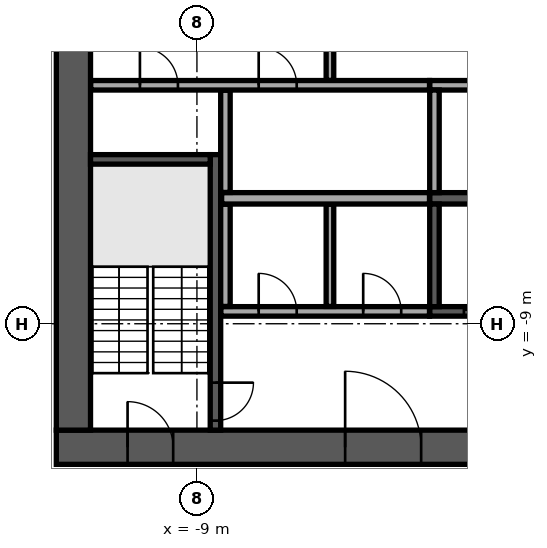
"""IFC4 building model, lengths in metres.
Left out: names, types, materials, properties, quantities, classifications, styles, units other than length and angle.
Written with IfcOpenShell. Run it as: python <this file> out.ifc"""

import sys

from ifc_helpers import new_model, si_unit, direction, frame, frame_2d, origin, place, context, subcontext, project, spatial, rectangle, extrude, element, fill, save


model = new_model("IFC4")
c1 = context("Model", 3, precision=1e-05, world=origin(), true_north=direction((0.0, 1.0)))
c2 = subcontext(c1, "Body", "Model", "MODEL_VIEW")
j1 = project(units=[si_unit("LENGTHUNIT", "METRE"), si_unit("PLANEANGLEUNIT", "RADIAN")], contexts=[c1])
p1 = place(None, origin())
s1 = spatial("IfcSite", under=j1, at=p1, CompositionType="ELEMENT")
p2 = place(p1, origin())
s2 = spatial("IfcBuilding", under=s1, at=p2, CompositionType="ELEMENT")
p3 = place(p2, frame((0.0, 0.0, 189.3)))
s3 = spatial("IfcBuildingStorey", under=s2, at=p3, CompositionType="ELEMENT", Elevation=189.3)
p4 = place(p3, frame((-12.7, -12.25, 0.0), z_axis=(0.0, 0.0, 1.0), x_axis=(1.0, 0.0, 0.0)))
e1 = element("IfcWall", 1, at=p4, inside=s3, PredefinedType="SHEAR", context=c2, shape_type="SweptSolid", body=[
    extrude(rectangle(XDim=25.4, YDim=0.9, at=frame_2d((12.7, 0.0))), origin(), (0.0, 0.0, 1.0), 3.62),
])
p5 = place(p4, frame((7.6, 0.0, 0.0)))
e2 = element("IfcOpeningElement", 2, at=p5, cuts=e1, PredefinedType="OPENING", context=c2, shape_type="SweptSolid", body=[
    extrude(rectangle(XDim=2.0, YDim=2.1, at=frame_2d((1.0, 1.05))), frame((0.0, 0.46, 0.0), z_axis=(0.0, -1.0, 0.0), x_axis=(1.0, 0.0, 0.0)), (0.0, 0.0, 1.0), 0.92),
])
p6 = place(p4, frame((17.725, 0.0, 0.0)))
e3 = element("IfcOpeningElement", 3, at=p6, cuts=e1, PredefinedType="OPENING", context=c2, shape_type="SweptSolid", body=[
    extrude(rectangle(XDim=1.2, YDim=2.1, at=frame_2d((0.6, 1.05))), frame((0.0, 0.46, 0.0), z_axis=(0.0, -1.0, 0.0), x_axis=(1.0, 0.0, 0.0)), (0.0, 0.0, 1.0), 0.92),
])
p7 = place(p4, frame((1.875, 0.0, 0.0)))
e4 = element("IfcOpeningElement", 4, at=p7, cuts=e1, PredefinedType="OPENING", context=c2, shape_type="SweptSolid", body=[
    extrude(rectangle(XDim=1.2, YDim=2.1, at=frame_2d((0.6, 1.05))), frame((0.0, 0.46, 0.0), z_axis=(0.0, -1.0, 0.0), x_axis=(1.0, 0.0, 0.0)), (0.0, 0.0, 1.0), 0.92),
])
p8 = place(p4, frame((22.325, 0.0, 0.0)))
e5 = element("IfcOpeningElement", 5, at=p8, cuts=e1, PredefinedType="OPENING", context=c2, shape_type="SweptSolid", body=[
    extrude(rectangle(XDim=1.2, YDim=2.1, at=frame_2d((0.6, 1.05))), frame((0.0, 0.46, 0.0), z_axis=(0.0, -1.0, 0.0), x_axis=(1.0, 0.0, 0.0)), (0.0, 0.0, 1.0), 0.92),
])
p9 = place(p3, frame((-12.25, -11.8, 0.0), z_axis=(0.0, 0.0, 1.0), x_axis=(0.0, 1.0, 0.0)))
e6 = element("IfcWall", 6, at=p9, inside=s3, PredefinedType="SHEAR", context=c2, shape_type="SweptSolid", body=[
    extrude(rectangle(XDim=23.6, YDim=0.9, at=frame_2d((11.8, 0.0))), origin(), (0.0, 0.0, 1.0), 3.62),
])
p10 = place(p9, frame((10.6, 0.0, 0.0)))
e7 = element("IfcOpeningElement", 7, at=p10, cuts=e6, PredefinedType="OPENING", context=c2, shape_type="SweptSolid", body=[
    extrude(rectangle(XDim=2.4, YDim=2.4, at=frame_2d((1.2, 1.2))), frame((0.0, 0.46, 0.0), z_axis=(0.0, -1.0, 0.0), x_axis=(1.0, 0.0, 0.0)), (0.0, 0.0, 1.0), 0.92),
])
p11 = place(p3, frame((-2.875, -5.7, 0.0), z_axis=(0.0, 0.0, 1.0), x_axis=(1.0, 0.0, 0.0)))
e8 = element("IfcWall", 8, at=p11, inside=s3, PredefinedType="SOLIDWALL", context=c2, shape_type="SweptSolid", body=[
    extrude(rectangle(XDim=11.25, YDim=0.3, at=frame_2d((5.625, 0.0))), origin(), (0.0, 0.0, 1.0), 3.62),
])
p12 = place(p3, frame((-2.875, -2.725, 0.0), z_axis=(0.0, 0.0, 1.0), x_axis=(1.0, 0.0, 0.0)))
e9 = element("IfcWall", 9, at=p12, inside=s3, PredefinedType="SOLIDWALL", context=c2, shape_type="SweptSolid", body=[
    extrude(rectangle(XDim=8.5, YDim=0.25, at=frame_2d((4.25, 0.0))), origin(), (0.0, 0.0, 1.0), 3.62),
])
p13 = place(p3, frame((-2.75, -5.55, 0.0), z_axis=(0.0, 0.0, 1.0), x_axis=(0.0, 1.0, 0.0)))
e10 = element("IfcWall", 10, at=p13, inside=s3, PredefinedType="SOLIDWALL", context=c2, shape_type="SweptSolid", body=[
    extrude(rectangle(XDim=2.7, YDim=0.25, at=frame_2d((1.35, 0.0))), origin(), (0.0, 0.0, 1.0), 3.62),
])
p14 = place(p3, frame((-2.875, -8.675, 0.0), z_axis=(0.0, 0.0, 1.0), x_axis=(1.0, 0.0, 0.0)))
e11 = element("IfcWall", 11, at=p14, inside=s3, PredefinedType="SOLIDWALL", context=c2, shape_type="SweptSolid", body=[
    extrude(rectangle(XDim=11.25, YDim=0.25, at=frame_2d((5.625, 0.0))), origin(), (0.0, 0.0, 1.0), 3.62),
])
p15 = place(p14, frame((0.9, 0.0, 0.0)))
e12 = element("IfcOpeningElement", 12, at=p15, cuts=e11, PredefinedType="OPENING", context=c2, shape_type="SweptSolid", body=[
    extrude(rectangle(XDim=1.2, YDim=2.1, at=frame_2d((0.6, 1.05))), frame((0.0, 0.135, 0.0), z_axis=(0.0, -1.0, 0.0), x_axis=(1.0, 0.0, 0.0)), (0.0, 0.0, 1.0), 0.27),
])
p16 = place(p14, frame((3.65, 0.0, 0.0)))
e13 = element("IfcOpeningElement", 13, at=p16, cuts=e11, PredefinedType="OPENING", context=c2, shape_type="SweptSolid", body=[
    extrude(rectangle(XDim=1.2, YDim=2.1, at=frame_2d((0.6, 1.05))), frame((0.0, 0.135, 0.0), z_axis=(0.0, -1.0, 0.0), x_axis=(1.0, 0.0, 0.0)), (0.0, 0.0, 1.0), 0.27),
])
p17 = place(p14, frame((6.4, 0.0, 0.0)))
e14 = element("IfcOpeningElement", 14, at=p17, cuts=e11, PredefinedType="OPENING", context=c2, shape_type="SweptSolid", body=[
    extrude(rectangle(XDim=1.2, YDim=2.1, at=frame_2d((0.6, 1.05))), frame((0.0, 0.135, 0.0), z_axis=(0.0, -1.0, 0.0), x_axis=(1.0, 0.0, 0.0)), (0.0, 0.0, 1.0), 0.27),
])
p18 = place(p14, frame((9.15, 0.0, 0.0)))
e15 = element("IfcOpeningElement", 15, at=p18, cuts=e11, PredefinedType="OPENING", context=c2, shape_type="SweptSolid", body=[
    extrude(rectangle(XDim=1.2, YDim=2.1, at=frame_2d((0.6, 1.05))), frame((0.0, 0.135, 0.0), z_axis=(0.0, -1.0, 0.0), x_axis=(1.0, 0.0, 0.0)), (0.0, 0.0, 1.0), 0.27),
])
p19 = place(p3, frame((-2.75, -8.55, 0.0), z_axis=(0.0, 0.0, 1.0), x_axis=(0.0, 1.0, 0.0)))
e16 = element("IfcWall", 16, at=p19, inside=s3, PredefinedType="SOLIDWALL", context=c2, shape_type="SweptSolid", body=[
    extrude(rectangle(XDim=2.7, YDim=0.25, at=frame_2d((1.35, 0.0))), origin(), (0.0, 0.0, 1.0), 3.62),
])
p20 = place(p3, frame((-8.512, -4.55, 0.0), z_axis=(0.0, 0.0, 1.0), x_axis=(0.0, -1.0, 0.0)))
e17 = element("IfcWall", 17, at=p20, inside=s3, PredefinedType="SOLIDWALL", context=c2, shape_type="SweptSolid", body=[
    extrude(rectangle(XDim=7.25, YDim=0.275, at=frame_2d((3.625, 0.0))), origin(), (0.0, 0.0, 1.0), 3.62),
])
p21 = place(p20, frame((6.0, 0.0, 0.0)))
e18 = element("IfcOpeningElement", 18, at=p21, cuts=e17, PredefinedType="OPENING", context=c2, shape_type="SweptSolid", body=[
    extrude(rectangle(XDim=1.0, YDim=2.1, at=frame_2d((0.5, 1.05))), frame((0.0, 0.147, 0.0), z_axis=(0.0, -1.0, 0.0), x_axis=(1.0, 0.0, 0.0)), (0.0, 0.0, 1.0), 0.295),
])
p22 = place(p3, frame((-8.65, -4.675, 0.0), z_axis=(0.0, 0.0, 1.0), x_axis=(-1.0, 0.0, 0.0)))
e19 = element("IfcWall", 19, at=p22, inside=s3, PredefinedType="SOLIDWALL", context=c2, shape_type="SweptSolid", body=[
    extrude(rectangle(XDim=3.15, YDim=0.25, at=frame_2d((1.575, 0.0))), origin(), (0.0, 0.0, 1.0), 3.62),
])
p23 = place(p3, frame((-8.37, -8.675, 0.0), z_axis=(0.0, 0.0, 1.0), x_axis=(1.0, 0.0, 0.0)))
e20 = element("IfcWall", 20, at=p23, inside=s3, PredefinedType="PARTITIONING", context=c2, shape_type="SweptSolid", body=[
    extrude(rectangle(XDim=5.49, YDim=0.25, at=frame_2d((2.745, 0.0))), origin(), (0.0, 0.0, 1.0), 3.62),
])
p24 = place(p23, frame((0.995, 0.0, 0.0)))
e21 = element("IfcOpeningElement", 21, at=p24, cuts=e20, PredefinedType="OPENING", context=c2, shape_type="SweptSolid", body=[
    extrude(rectangle(XDim=1.0, YDim=2.1, at=frame_2d((0.5, 1.05))), frame((0.0, 0.135, 0.0), z_axis=(0.0, -1.0, 0.0), x_axis=(1.0, 0.0, 0.0)), (0.0, 0.0, 1.0), 0.27),
])
p25 = place(p23, frame((3.745, 0.0, 0.0)))
e22 = element("IfcOpeningElement", 22, at=p25, cuts=e20, PredefinedType="OPENING", context=c2, shape_type="SweptSolid", body=[
    extrude(rectangle(XDim=1.0, YDim=2.1, at=frame_2d((0.5, 1.05))), frame((0.0, 0.135, 0.0), z_axis=(0.0, -1.0, 0.0), x_axis=(1.0, 0.0, 0.0)), (0.0, 0.0, 1.0), 0.27),
])
p26 = place(p3, frame((-8.25, -8.545, 0.0), z_axis=(0.0, 0.0, 1.0), x_axis=(0.0, 1.0, 0.0)))
e23 = element("IfcWall", 23, at=p26, inside=s3, PredefinedType="PARTITIONING", context=c2, shape_type="SweptSolid", body=[
    extrude(rectangle(XDim=2.69, YDim=0.25, at=frame_2d((1.345, 0.0))), origin(), (0.0, 0.0, 1.0), 3.62),
])
p27 = place(p3, frame((-5.5, -8.545, 0.0), z_axis=(0.0, 0.0, 1.0), x_axis=(0.0, 1.0, 0.0)))
e24 = element("IfcWall", 24, at=p27, inside=s3, PredefinedType="PARTITIONING", context=c2, shape_type="SweptSolid", body=[
    extrude(rectangle(XDim=2.69, YDim=0.2, at=frame_2d((1.345, 0.0))), origin(), (0.0, 0.0, 1.0), 3.62),
])
p28 = place(p3, frame((-8.35, -5.7, 0.0), z_axis=(0.0, 0.0, 1.0), x_axis=(1.0, 0.0, 0.0)))
e25 = element("IfcWall", 25, at=p28, inside=s3, PredefinedType="PARTITIONING", context=c2, shape_type="SweptSolid", body=[
    extrude(rectangle(XDim=5.47, YDim=0.3, at=frame_2d((2.735, 0.0))), origin(), (0.0, 0.0, 1.0), 3.62),
])
p29 = place(p3, frame((-8.25, -5.545, 0.0), z_axis=(0.0, 0.0, 1.0), x_axis=(0.0, 1.0, 0.0)))
e26 = element("IfcWall", 26, at=p29, inside=s3, PredefinedType="PARTITIONING", context=c2, shape_type="SweptSolid", body=[
    extrude(rectangle(XDim=2.69, YDim=0.25, at=frame_2d((1.345, 0.0))), origin(), (0.0, 0.0, 1.0), 3.62),
])
p30 = place(p3, frame((-11.795, -2.725, 0.0), z_axis=(0.0, 0.0, 1.0), x_axis=(1.0, 0.0, 0.0)))
e27 = element("IfcWall", 27, at=p30, inside=s3, PredefinedType="PARTITIONING", context=c2, shape_type="SweptSolid", body=[
    extrude(rectangle(XDim=8.915, YDim=0.25, at=frame_2d((4.458, 0.0))), origin(), (0.0, 0.0, 1.0), 3.62),
])
p31 = place(p30, frame((1.295, 0.0, 0.0)))
e28 = element("IfcOpeningElement", 28, at=p31, cuts=e27, PredefinedType="OPENING", context=c2, shape_type="SweptSolid", body=[
    extrude(rectangle(XDim=1.0, YDim=2.1, at=frame_2d((0.5, 1.05))), frame((0.0, 0.135, 0.0), z_axis=(0.0, -1.0, 0.0), x_axis=(1.0, 0.0, 0.0)), (0.0, 0.0, 1.0), 0.27),
])
p32 = place(p30, frame((4.42, 0.0, 0.0)))
e29 = element("IfcOpeningElement", 29, at=p32, cuts=e27, PredefinedType="OPENING", context=c2, shape_type="SweptSolid", body=[
    extrude(rectangle(XDim=1.0, YDim=2.1, at=frame_2d((0.5, 1.05))), frame((0.0, 0.135, 0.0), z_axis=(0.0, -1.0, 0.0), x_axis=(1.0, 0.0, 0.0)), (0.0, 0.0, 1.0), 0.27),
])
p33 = place(p3, frame((-5.5, -2.595, 0.0), z_axis=(0.0, 0.0, 1.0), x_axis=(0.0, 1.0, 0.0)))
e30 = element("IfcWall", 30, at=p33, inside=s3, PredefinedType="PARTITIONING", context=c2, shape_type="SweptSolid", body=[
    extrude(rectangle(XDim=5.19, YDim=0.2, at=frame_2d((2.595, 0.0))), origin(), (0.0, 0.0, 1.0), 3.62),
])
p34 = place(p33, frame((1.395, 0.0, 0.0)))
e31 = element("IfcOpeningElement", 31, at=p34, cuts=e30, PredefinedType="OPENING", context=c2, shape_type="SweptSolid", body=[
    extrude(rectangle(XDim=2.4, YDim=2.4, at=frame_2d((1.2, 1.2))), frame((0.0, 0.11, 0.0), z_axis=(0.0, -1.0, 0.0), x_axis=(1.0, 0.0, 0.0)), (0.0, 0.0, 1.0), 0.22),
])
p35 = place(p3, frame((-35.208, -4.768, 0.0), z_axis=(0.0, 0.0, 1.0), x_axis=(0.656058749455, -0.754709823219, 0.0)))
e32 = element("IfcWall", 32, at=p35, inside=s3, PredefinedType="STANDARD", context=c2, shape_type="SweptSolid", body=[
    extrude(rectangle(XDim=39.0, YDim=0.6, at=frame_2d((19.5, 0.0))), origin(), (0.0, 0.0, 1.0), 3.62),
])
p36 = place(p35, frame((1.217, 0.0, 0.9)))
e33 = element("IfcOpeningElement", 33, at=p36, cuts=e32, PredefinedType="OPENING", context=c2, shape_type="SweptSolid", body=[
    extrude(rectangle(XDim=1.9, YDim=2.1, at=frame_2d((0.95, 1.05))), frame((0.0, 0.31, 0.0), z_axis=(0.0, -1.0, 0.0), x_axis=(1.0, 0.0, 0.0)), (0.0, 0.0, 1.0), 0.62),
])
p37 = place(p35, frame((5.55, 0.0, 0.9)))
e34 = element("IfcOpeningElement", 34, at=p37, cuts=e32, PredefinedType="OPENING", context=c2, shape_type="SweptSolid", body=[
    extrude(rectangle(XDim=1.9, YDim=2.1, at=frame_2d((0.95, 1.05))), frame((0.0, 0.31, 0.0), z_axis=(0.0, -1.0, 0.0), x_axis=(1.0, 0.0, 0.0)), (0.0, 0.0, 1.0), 0.62),
])
p38 = place(p35, frame((9.883, 0.0, 0.9)))
e35 = element("IfcOpeningElement", 35, at=p38, cuts=e32, PredefinedType="OPENING", context=c2, shape_type="SweptSolid", body=[
    extrude(rectangle(XDim=1.9, YDim=2.1, at=frame_2d((0.95, 1.05))), frame((0.0, 0.31, 0.0), z_axis=(0.0, -1.0, 0.0), x_axis=(1.0, 0.0, 0.0)), (0.0, 0.0, 1.0), 0.62),
])
p39 = place(p35, frame((14.217, 0.0, 0.9)))
e36 = element("IfcOpeningElement", 36, at=p39, cuts=e32, PredefinedType="OPENING", context=c2, shape_type="SweptSolid", body=[
    extrude(rectangle(XDim=1.9, YDim=2.1, at=frame_2d((0.95, 1.05))), frame((0.0, 0.31, 0.0), z_axis=(0.0, -1.0, 0.0), x_axis=(1.0, 0.0, 0.0)), (0.0, 0.0, 1.0), 0.62),
])
p40 = place(p35, frame((18.55, 0.0, 0.9)))
e37 = element("IfcOpeningElement", 37, at=p40, cuts=e32, PredefinedType="OPENING", context=c2, shape_type="SweptSolid", body=[
    extrude(rectangle(XDim=1.9, YDim=2.1, at=frame_2d((0.95, 1.05))), frame((0.0, 0.31, 0.0), z_axis=(0.0, -1.0, 0.0), x_axis=(1.0, 0.0, 0.0)), (0.0, 0.0, 1.0), 0.62),
])
p41 = place(p35, frame((22.883, 0.0, 0.9)))
e38 = element("IfcOpeningElement", 38, at=p41, cuts=e32, PredefinedType="OPENING", context=c2, shape_type="SweptSolid", body=[
    extrude(rectangle(XDim=1.9, YDim=2.1, at=frame_2d((0.95, 1.05))), frame((0.0, 0.31, 0.0), z_axis=(0.0, -1.0, 0.0), x_axis=(1.0, 0.0, 0.0)), (0.0, 0.0, 1.0), 0.62),
])
p42 = place(p35, frame((27.217, 0.0, 0.9)))
e39 = element("IfcOpeningElement", 39, at=p42, cuts=e32, PredefinedType="OPENING", context=c2, shape_type="SweptSolid", body=[
    extrude(rectangle(XDim=1.9, YDim=2.1, at=frame_2d((0.95, 1.05))), frame((0.0, 0.31, 0.0), z_axis=(0.0, -1.0, 0.0), x_axis=(1.0, 0.0, 0.0)), (0.0, 0.0, 1.0), 0.62),
])
p43 = place(p35, frame((31.55, 0.0, 0.9)))
e40 = element("IfcOpeningElement", 40, at=p43, cuts=e32, PredefinedType="OPENING", context=c2, shape_type="SweptSolid", body=[
    extrude(rectangle(XDim=1.9, YDim=2.1, at=frame_2d((0.95, 1.05))), frame((0.0, 0.31, 0.0), z_axis=(0.0, -1.0, 0.0), x_axis=(1.0, 0.0, 0.0)), (0.0, 0.0, 1.0), 0.62),
])
p44 = place(p35, frame((35.883, 0.0, 0.9)))
e41 = element("IfcOpeningElement", 41, at=p44, cuts=e32, PredefinedType="OPENING", context=c2, shape_type="SweptSolid", body=[
    extrude(rectangle(XDim=1.9, YDim=2.1, at=frame_2d((0.95, 1.05))), frame((0.0, 0.31, 0.0), z_axis=(0.0, -1.0, 0.0), x_axis=(1.0, 0.0, 0.0)), (0.0, 0.0, 1.0), 0.62),
])
p45 = place(p3, frame((-2.286, -34.715, 0.0), z_axis=(0.0, 0.0, 1.0), x_axis=(0.754708272811, 0.656060532993, 0.0)))
e42 = element("IfcWall", 42, at=p45, inside=s3, PredefinedType="STANDARD", context=c2, shape_type="SweptSolid", body=[
    extrude(rectangle(XDim=49.0, YDim=0.6, at=frame_2d((24.5, 0.0))), origin(), (0.0, 0.0, 1.0), 3.62),
])
p46 = place(p45, frame((1.227, 0.0, 0.9)))
e43 = element("IfcOpeningElement", 43, at=p46, cuts=e42, PredefinedType="OPENING", context=c2, shape_type="SweptSolid", body=[
    extrude(rectangle(XDim=2.0, YDim=2.1, at=frame_2d((1.0, 1.05))), frame((0.0, 0.31, 0.0), z_axis=(0.0, -1.0, 0.0), x_axis=(1.0, 0.0, 0.0)), (0.0, 0.0, 1.0), 0.62),
])
p47 = place(p45, frame((5.682, 0.0, 0.9)))
e44 = element("IfcOpeningElement", 44, at=p47, cuts=e42, PredefinedType="OPENING", context=c2, shape_type="SweptSolid", body=[
    extrude(rectangle(XDim=2.0, YDim=2.1, at=frame_2d((1.0, 1.05))), frame((0.0, 0.31, 0.0), z_axis=(0.0, -1.0, 0.0), x_axis=(1.0, 0.0, 0.0)), (0.0, 0.0, 1.0), 0.62),
])
p48 = place(p45, frame((10.136, 0.0, 0.9)))
e45 = element("IfcOpeningElement", 45, at=p48, cuts=e42, PredefinedType="OPENING", context=c2, shape_type="SweptSolid", body=[
    extrude(rectangle(XDim=2.0, YDim=2.1, at=frame_2d((1.0, 1.05))), frame((0.0, 0.31, 0.0), z_axis=(0.0, -1.0, 0.0), x_axis=(1.0, 0.0, 0.0)), (0.0, 0.0, 1.0), 0.62),
])
p49 = place(p45, frame((14.591, 0.0, 0.9)))
e46 = element("IfcOpeningElement", 46, at=p49, cuts=e42, PredefinedType="OPENING", context=c2, shape_type="SweptSolid", body=[
    extrude(rectangle(XDim=2.0, YDim=2.1, at=frame_2d((1.0, 1.05))), frame((0.0, 0.31, 0.0), z_axis=(0.0, -1.0, 0.0), x_axis=(1.0, 0.0, 0.0)), (0.0, 0.0, 1.0), 0.62),
])
p50 = place(p45, frame((19.045, 0.0, 0.9)))
e47 = element("IfcOpeningElement", 47, at=p50, cuts=e42, PredefinedType="OPENING", context=c2, shape_type="SweptSolid", body=[
    extrude(rectangle(XDim=2.0, YDim=2.1, at=frame_2d((1.0, 1.05))), frame((0.0, 0.31, 0.0), z_axis=(0.0, -1.0, 0.0), x_axis=(1.0, 0.0, 0.0)), (0.0, 0.0, 1.0), 0.62),
])
p51 = place(p45, frame((23.5, 0.0, 0.9)))
e48 = element("IfcOpeningElement", 48, at=p51, cuts=e42, PredefinedType="OPENING", context=c2, shape_type="SweptSolid", body=[
    extrude(rectangle(XDim=2.0, YDim=2.1, at=frame_2d((1.0, 1.05))), frame((0.0, 0.31, 0.0), z_axis=(0.0, -1.0, 0.0), x_axis=(1.0, 0.0, 0.0)), (0.0, 0.0, 1.0), 0.62),
])
p52 = place(p45, frame((27.955, 0.0, 0.9)))
e49 = element("IfcOpeningElement", 49, at=p52, cuts=e42, PredefinedType="OPENING", context=c2, shape_type="SweptSolid", body=[
    extrude(rectangle(XDim=2.0, YDim=2.1, at=frame_2d((1.0, 1.05))), frame((0.0, 0.31, 0.0), z_axis=(0.0, -1.0, 0.0), x_axis=(1.0, 0.0, 0.0)), (0.0, 0.0, 1.0), 0.62),
])
p53 = place(p45, frame((32.409, 0.0, 0.9)))
e50 = element("IfcOpeningElement", 50, at=p53, cuts=e42, PredefinedType="OPENING", context=c2, shape_type="SweptSolid", body=[
    extrude(rectangle(XDim=2.0, YDim=2.1, at=frame_2d((1.0, 1.05))), frame((0.0, 0.31, 0.0), z_axis=(0.0, -1.0, 0.0), x_axis=(1.0, 0.0, 0.0)), (0.0, 0.0, 1.0), 0.62),
])
p54 = place(p45, frame((36.864, 0.0, 0.9)))
e51 = element("IfcOpeningElement", 51, at=p54, cuts=e42, PredefinedType="OPENING", context=c2, shape_type="SweptSolid", body=[
    extrude(rectangle(XDim=2.0, YDim=2.1, at=frame_2d((1.0, 1.05))), frame((0.0, 0.31, 0.0), z_axis=(0.0, -1.0, 0.0), x_axis=(1.0, 0.0, 0.0)), (0.0, 0.0, 1.0), 0.62),
])
p55 = place(p45, frame((41.318, 0.0, 0.9)))
e52 = element("IfcOpeningElement", 52, at=p55, cuts=e42, PredefinedType="OPENING", context=c2, shape_type="SweptSolid", body=[
    extrude(rectangle(XDim=2.0, YDim=2.1, at=frame_2d((1.0, 1.05))), frame((0.0, 0.31, 0.0), z_axis=(0.0, -1.0, 0.0), x_axis=(1.0, 0.0, 0.0)), (0.0, 0.0, 1.0), 0.62),
])
p56 = place(p45, frame((45.773, 0.0, 0.9)))
e53 = element("IfcOpeningElement", 53, at=p56, cuts=e42, PredefinedType="OPENING", context=c2, shape_type="SweptSolid", body=[
    extrude(rectangle(XDim=2.0, YDim=2.1, at=frame_2d((1.0, 1.05))), frame((0.0, 0.31, 0.0), z_axis=(0.0, -1.0, 0.0), x_axis=(1.0, 0.0, 0.0)), (0.0, 0.0, 1.0), 0.62),
])
p57 = place(p3, frame((-24.98, -4.673, 0.0), z_axis=(0.0, 0.0, 1.0), x_axis=(0.656048444225, -0.754718781289, 0.0)))
e54 = element("IfcWall", 54, at=p57, inside=s3, PredefinedType="PARTITIONING", context=c2, shape_type="SweptSolid", body=[
    extrude(rectangle(XDim=25.8, YDim=0.15, at=frame_2d((12.9, 0.0))), origin(), (0.0, 0.0, 1.0), 3.17),
])
p58 = place(p57, frame((12.071, 0.0, 0.0)))
e55 = element("IfcOpeningElement", 55, at=p58, cuts=e54, PredefinedType="OPENING", context=c2, shape_type="SweptSolid", body=[
    extrude(rectangle(XDim=1.0, YDim=2.1, at=frame_2d((0.5, 1.05))), frame((0.0, 0.085, 0.0), z_axis=(0.0, -1.0, 0.0), x_axis=(1.0, 0.0, 0.0)), (0.0, 0.0, 1.0), 0.17),
])
p59 = place(p57, frame((24.318, 0.0, 0.0)))
e56 = element("IfcOpeningElement", 56, at=p59, cuts=e54, PredefinedType="OPENING", context=c2, shape_type="SweptSolid", body=[
    extrude(rectangle(XDim=1.0, YDim=2.1, at=frame_2d((0.5, 1.05))), frame((0.0, 0.085, 0.0), z_axis=(0.0, -1.0, 0.0), x_axis=(1.0, 0.0, 0.0)), (0.0, 0.0, 1.0), 0.17),
])
p60 = place(p5, origin())
e57 = element("IfcDoor", 57, at=p60, inside=s3, OperationType="SINGLE_SWING_LEFT", PredefinedType="DOOR", context=c2, shape_type="SweptSolid", body=[
    extrude(rectangle(XDim=2.0, YDim=2.1, at=frame_2d((1.0, 1.05))), frame((0.0, 0.025, 0.0), z_axis=(0.0, -1.0, 0.0), x_axis=(1.0, 0.0, 0.0)), (0.0, 0.0, 1.0), 0.05),
])
fill(e2, e57)
p61 = place(p7, origin())
e58 = element("IfcDoor", 58, at=p61, inside=s3, OperationType="SINGLE_SWING_LEFT", PredefinedType="DOOR", context=c2, shape_type="SweptSolid", body=[
    extrude(rectangle(XDim=1.2, YDim=2.1, at=frame_2d((0.6, 1.05))), frame((0.0, 0.025, 0.0), z_axis=(0.0, -1.0, 0.0), x_axis=(1.0, 0.0, 0.0)), (0.0, 0.0, 1.0), 0.05),
])
fill(e4, e58)
p62 = place(p15, origin())
e59 = element("IfcDoor", 59, at=p62, inside=s3, OperationType="DOUBLE_DOOR_SLIDING", PredefinedType="DOOR", context=c2, shape_type="SweptSolid", body=[
    extrude(rectangle(XDim=1.2, YDim=2.1, at=frame_2d((0.6, 1.05))), frame((0.0, 0.025, 0.0), z_axis=(0.0, -1.0, 0.0), x_axis=(1.0, 0.0, 0.0)), (0.0, 0.0, 1.0), 0.05),
])
fill(e12, e59)
p63 = place(p21, origin())
e60 = element("IfcDoor", 60, at=p63, inside=s3, OperationType="SINGLE_SWING_LEFT", PredefinedType="DOOR", context=c2, shape_type="SweptSolid", body=[
    extrude(rectangle(XDim=1.0, YDim=2.1, at=frame_2d((0.5, 1.05))), frame((0.0, 0.025, 0.0), z_axis=(0.0, -1.0, 0.0), x_axis=(1.0, 0.0, 0.0)), (0.0, 0.0, 1.0), 0.05),
])
fill(e18, e60)
p64 = place(p24, origin())
e61 = element("IfcDoor", 61, at=p64, inside=s3, OperationType="SINGLE_SWING_LEFT", PredefinedType="DOOR", context=c2, shape_type="SweptSolid", body=[
    extrude(rectangle(XDim=1.0, YDim=2.1, at=frame_2d((0.5, 1.05))), frame((0.0, 0.025, 0.0), z_axis=(0.0, -1.0, 0.0), x_axis=(1.0, 0.0, 0.0)), (0.0, 0.0, 1.0), 0.05),
])
fill(e21, e61)
p65 = place(p25, origin())
e62 = element("IfcDoor", 62, at=p65, inside=s3, OperationType="SINGLE_SWING_LEFT", PredefinedType="DOOR", context=c2, shape_type="SweptSolid", body=[
    extrude(rectangle(XDim=1.0, YDim=2.1, at=frame_2d((0.5, 1.05))), frame((0.0, 0.025, 0.0), z_axis=(0.0, -1.0, 0.0), x_axis=(1.0, 0.0, 0.0)), (0.0, 0.0, 1.0), 0.05),
])
fill(e22, e62)
p66 = place(p31, origin())
e63 = element("IfcDoor", 63, at=p66, inside=s3, OperationType="SINGLE_SWING_LEFT", PredefinedType="DOOR", context=c2, shape_type="SweptSolid", body=[
    extrude(rectangle(XDim=1.0, YDim=2.1, at=frame_2d((0.5, 1.05))), frame((0.0, 0.025, 0.0), z_axis=(0.0, -1.0, 0.0), x_axis=(1.0, 0.0, 0.0)), (0.0, 0.0, 1.0), 0.05),
])
fill(e28, e63)
p67 = place(p32, origin())
e64 = element("IfcDoor", 64, at=p67, inside=s3, OperationType="SINGLE_SWING_LEFT", PredefinedType="DOOR", context=c2, shape_type="SweptSolid", body=[
    extrude(rectangle(XDim=1.0, YDim=2.1, at=frame_2d((0.5, 1.05))), frame((0.0, 0.025, 0.0), z_axis=(0.0, -1.0, 0.0), x_axis=(1.0, 0.0, 0.0)), (0.0, 0.0, 1.0), 0.05),
])
fill(e29, e64)
save(model, sys.argv[1])
